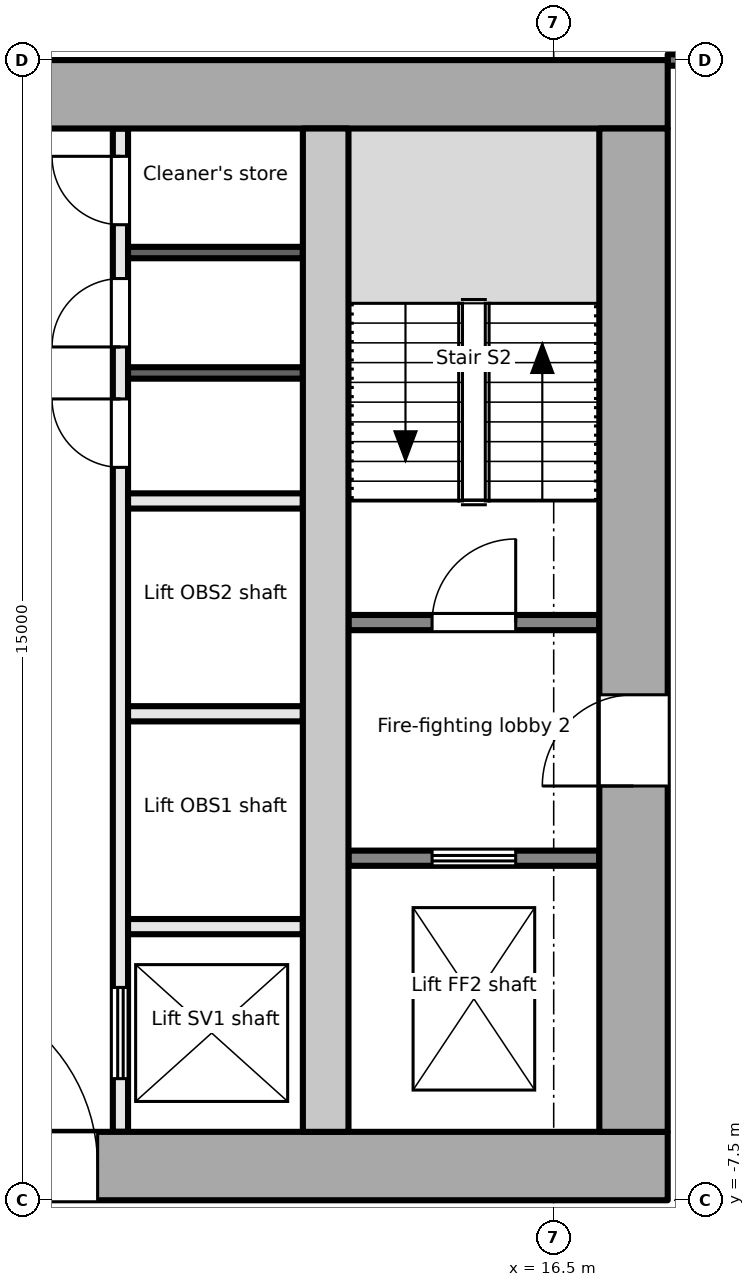
"""IFC4 building model, lengths in metres.
Left out: names, types, materials, properties, quantities, classifications, styles, units other than length and angle.
Written with IfcOpenShell. Run it as: python <this file> out.ifc"""

import sys

from ifc_helpers import new_model, si_unit, direction, frame, frame_2d, origin, place, context, subcontext, project, spatial, rectangle, extrude, element, fill, save


model = new_model("IFC4")
c1 = context("Model", 3, precision=1e-05, world=origin(), true_north=direction((0.0, 1.0)))
c2 = subcontext(c1, "Body", "Model", "MODEL_VIEW")
j1 = project(units=[si_unit("LENGTHUNIT", "METRE"), si_unit("PLANEANGLEUNIT", "RADIAN")], contexts=[c1])
p1 = place(None, origin())
s1 = spatial("IfcSite", under=j1, at=p1, CompositionType="ELEMENT")
p2 = place(p1, origin())
s2 = spatial("IfcBuilding", under=s1, at=p2, CompositionType="ELEMENT")
p3 = place(p2, frame((0.0, 0.0, 213.5)))
s3 = spatial("IfcBuildingStorey", under=s2, at=p3, CompositionType="ELEMENT", Elevation=213.5)
p4 = place(p3, frame((-18.0, -7.05, -0.2), z_axis=(0.0, 0.0, 1.0), x_axis=(1.0, 0.0, 0.0)))
e1 = element("IfcWall", 1, at=p4, inside=s3, PredefinedType="SHEAR", context=c2, shape_type="SweptSolid", body=[
    extrude(rectangle(XDim=36.0, YDim=0.9, at=frame_2d((18.0, 0.0))), origin(), (0.0, 0.0, 1.0), 3.9),
])
p5 = place(p4, frame((4.9, 0.0, 0.2)))
e2 = element("IfcOpeningElement", 2, at=p5, cuts=e1, PredefinedType="OPENING", context=c2, shape_type="SweptSolid", body=[
    extrude(rectangle(XDim=1.8, YDim=2.1, at=frame_2d((0.9, 1.05))), frame((0.0, 0.46, 0.0), z_axis=(0.0, -1.0, 0.0), x_axis=(1.0, 0.0, 0.0)), (0.0, 0.0, 1.0), 0.921),
])
p6 = place(p4, frame((16.8, 0.0, 0.2)))
e3 = element("IfcOpeningElement", 3, at=p6, cuts=e1, PredefinedType="OPENING", context=c2, shape_type="SweptSolid", body=[
    extrude(rectangle(XDim=2.4, YDim=2.1, at=frame_2d((1.2, 1.05))), frame((0.0, 0.46, 0.0), z_axis=(0.0, -1.0, 0.0), x_axis=(1.0, 0.0, 0.0)), (0.0, 0.0, 1.0), 0.921),
])
p7 = place(p4, frame((26.1, 0.0, 0.2)))
e4 = element("IfcOpeningElement", 4, at=p7, cuts=e1, PredefinedType="OPENING", context=c2, shape_type="SweptSolid", body=[
    extrude(rectangle(XDim=2.4, YDim=2.1, at=frame_2d((1.2, 1.05))), frame((0.0, 0.46, 0.0), z_axis=(0.0, -1.0, 0.0), x_axis=(1.0, 0.0, 0.0)), (0.0, 0.0, 1.0), 0.921),
])
p8 = place(p3, frame((-18.0, 7.05, -0.2), z_axis=(0.0, 0.0, 1.0), x_axis=(1.0, 0.0, 0.0)))
e5 = element("IfcWall", 5, at=p8, inside=s3, PredefinedType="SHEAR", context=c2, shape_type="SweptSolid", body=[
    extrude(rectangle(XDim=36.0, YDim=0.9, at=frame_2d((18.0, 0.0))), origin(), (0.0, 0.0, 1.0), 3.9),
])
p9 = place(p3, frame((17.55, -6.6, -0.2), z_axis=(0.0, 0.0, 1.0), x_axis=(0.0, 1.0, 0.0)))
e6 = element("IfcWall", 6, at=p9, inside=s3, PredefinedType="SHEAR", context=c2, shape_type="SweptSolid", body=[
    extrude(rectangle(XDim=13.2, YDim=0.9, at=frame_2d((6.6, 0.0))), origin(), (0.0, 0.0, 1.0), 3.9),
])
p10 = place(p9, frame((4.55, 0.0, 0.2)))
e7 = element("IfcOpeningElement", 7, at=p10, cuts=e6, PredefinedType="OPENING", context=c2, shape_type="SweptSolid", body=[
    extrude(rectangle(XDim=1.2, YDim=2.1, at=frame_2d((0.6, 1.05))), frame((0.0, 0.46, 0.0), z_axis=(0.0, -1.0, 0.0), x_axis=(1.0, 0.0, 0.0)), (0.0, 0.0, 1.0), 0.921),
])
p11 = place(p3, frame((13.5, -6.6, -0.2), z_axis=(0.0, 0.0, 1.0), x_axis=(0.0, 1.0, 0.0)))
e8 = element("IfcWall", 8, at=p11, inside=s3, PredefinedType="SHEAR", context=c2, shape_type="SweptSolid", body=[
    extrude(rectangle(XDim=13.2, YDim=0.6, at=frame_2d((6.6, 0.0))), origin(), (0.0, 0.0, 1.0), 3.9),
])
p12 = place(p3, frame((13.8, -3.0, 0.0), z_axis=(0.0, 0.0, 1.0), x_axis=(1.0, 0.0, 0.0)))
e9 = element("IfcWall", 9, at=p12, inside=s3, PredefinedType="PARTITIONING", context=c2, shape_type="SweptSolid", body=[
    extrude(rectangle(XDim=3.3, YDim=0.2, at=frame_2d((1.65, 0.0))), origin(), (0.0, 0.0, 1.0), 3.7),
])
p13 = place(p12, frame((1.1, 0.0, 0.0)))
e10 = element("IfcOpeningElement", 10, at=p13, cuts=e9, PredefinedType="OPENING", context=c2, shape_type="SweptSolid", body=[
    extrude(rectangle(XDim=1.1, YDim=2.1, at=frame_2d((0.55, 1.05))), frame((0.0, 0.111, 0.0), z_axis=(0.0, -1.0, 0.0), x_axis=(1.0, 0.0, 0.0)), (0.0, 0.0, 1.0), 0.221),
])
p14 = place(p3, frame((13.8, 0.1, 0.0), z_axis=(0.0, 0.0, 1.0), x_axis=(1.0, 0.0, 0.0)))
e11 = element("IfcWall", 11, at=p14, inside=s3, PredefinedType="PARTITIONING", context=c2, shape_type="SweptSolid", body=[
    extrude(rectangle(XDim=3.3, YDim=0.2, at=frame_2d((1.65, 0.0))), origin(), (0.0, 0.0, 1.0), 3.7),
])
p15 = place(p14, frame((1.1, 0.0, 0.0)))
e12 = element("IfcOpeningElement", 12, at=p15, cuts=e11, PredefinedType="OPENING", context=c2, shape_type="SweptSolid", body=[
    extrude(rectangle(XDim=1.1, YDim=2.1, at=frame_2d((0.55, 1.05))), frame((0.0, 0.111, 0.0), z_axis=(0.0, -1.0, 0.0), x_axis=(1.0, 0.0, 0.0)), (0.0, 0.0, 1.0), 0.221),
])
p16 = place(p3, frame((10.8, -6.6, 0.0), z_axis=(0.0, 0.0, 1.0), x_axis=(0.0, 1.0, 0.0)))
e13 = element("IfcWall", 13, at=p16, inside=s3, PredefinedType="PARTITIONING", context=c2, shape_type="SweptSolid", body=[
    extrude(rectangle(XDim=13.2, YDim=0.2, at=frame_2d((6.6, 0.0))), origin(), (0.0, 0.0, 1.0), 3.7),
])
p17 = place(p16, frame((0.7, 0.0, 0.0)))
e14 = element("IfcOpeningElement", 14, at=p17, cuts=e13, PredefinedType="OPENING", context=c2, shape_type="SweptSolid", body=[
    extrude(rectangle(XDim=1.2, YDim=2.1, at=frame_2d((0.6, 1.05))), frame((0.0, 0.111, 0.0), z_axis=(0.0, -1.0, 0.0), x_axis=(1.0, 0.0, 0.0)), (0.0, 0.0, 1.0), 0.221),
])
p18 = place(p16, frame((8.742, 0.0, 0.0)))
e15 = element("IfcOpeningElement", 15, at=p18, cuts=e13, PredefinedType="OPENING", context=c2, shape_type="SweptSolid", body=[
    extrude(rectangle(XDim=0.9, YDim=2.1, at=frame_2d((0.45, 1.05))), frame((0.0, 0.111, 0.0), z_axis=(0.0, -1.0, 0.0), x_axis=(1.0, 0.0, 0.0)), (0.0, 0.0, 1.0), 0.221),
])
p19 = place(p16, frame((10.326, 0.0, 0.0)))
e16 = element("IfcOpeningElement", 16, at=p19, cuts=e13, PredefinedType="OPENING", context=c2, shape_type="SweptSolid", body=[
    extrude(rectangle(XDim=0.9, YDim=2.1, at=frame_2d((0.45, 1.05))), frame((0.0, 0.111, 0.0), z_axis=(0.0, -1.0, 0.0), x_axis=(1.0, 0.0, 0.0)), (0.0, 0.0, 1.0), 0.221),
])
p20 = place(p16, frame((11.934, 0.0, 0.0)))
e17 = element("IfcOpeningElement", 17, at=p20, cuts=e13, PredefinedType="OPENING", context=c2, shape_type="SweptSolid", body=[
    extrude(rectangle(XDim=0.9, YDim=2.1, at=frame_2d((0.45, 1.05))), frame((0.0, 0.111, 0.0), z_axis=(0.0, -1.0, 0.0), x_axis=(1.0, 0.0, 0.0)), (0.0, 0.0, 1.0), 0.221),
])
for number, where, z_axis, x_axis in (
    (18, (10.9, -3.9, 0.0), (0.0, 0.0, 1.0), (1.0, 0.0, 0.0)),
    (19, (10.9, -1.1, 0.0), (0.0, 0.0, 1.0), (1.0, 0.0, 0.0)),
    (20, (10.9, 1.7, 0.0), (0.0, 0.0, 1.0), (1.0, 0.0, 0.0)),
):
    element("IfcWall", number, at=place(p3, frame(where, z_axis=z_axis, x_axis=x_axis)), inside=s3, PredefinedType="PARTITIONING", context=c2, shape_type="SweptSolid", body=[
        extrude(rectangle(XDim=2.3, YDim=0.2, at=frame_2d((1.15, 0.0))), origin(), (0.0, 0.0, 1.0), 3.7),
    ])
for number, where, z_axis, x_axis in (
    (21, (10.9, 3.384, 0.0), (0.0, 0.0, 1.0), (1.0, 0.0, 0.0)),
    (22, (10.9, 4.968, 0.0), (0.0, 0.0, 1.0), (1.0, 0.0, 0.0)),
):
    element("IfcWall", number, at=place(p3, frame(where, z_axis=z_axis, x_axis=x_axis)), inside=s3, PredefinedType="PARTITIONING", context=c2, shape_type="SweptSolid", body=[
        extrude(rectangle(XDim=2.3, YDim=0.15, at=frame_2d((1.15, 0.0))), origin(), (0.0, 0.0, 1.0), 3.7),
    ])
p21 = place(p3, frame((18.0, 7.501, 0.0), z_axis=(0.0, 0.0, 1.0), x_axis=(1.0, 0.0, 0.0)))
e23 = element("IfcWall", 23, at=p21, inside=s3, PredefinedType="PARTITIONING", context=c2, shape_type="SweptSolid", body=[
    extrude(rectangle(XDim=2.625, YDim=0.15, at=frame_2d((1.312, 0.0))), origin(), (0.0, 0.0, 1.0), 3.7),
])
p22 = place(p13, origin())
e24 = element("IfcDoor", 24, at=p22, inside=s3, OperationType="DOUBLE_DOOR_SLIDING", PredefinedType="DOOR", context=c2, shape_type="SweptSolid", body=[
    extrude(rectangle(XDim=1.1, YDim=2.1, at=frame_2d((0.55, 1.05))), frame((0.0, 0.025, 0.0), z_axis=(0.0, -1.0, 0.0), x_axis=(1.0, 0.0, 0.0)), (0.0, 0.0, 1.0), 0.05),
])
fill(e10, e24)
p23 = place(p10, origin())
e25 = element("IfcDoor", 25, at=p23, inside=s3, OperationType="SINGLE_SWING_LEFT", PredefinedType="DOOR", context=c2, shape_type="SweptSolid", body=[
    extrude(rectangle(XDim=1.2, YDim=2.1, at=frame_2d((0.6, 1.05))), frame((0.0, 0.025, 0.0), z_axis=(0.0, -1.0, 0.0), x_axis=(1.0, 0.0, 0.0)), (0.0, 0.0, 1.0), 0.05),
])
fill(e7, e25)
p24 = place(p15, origin())
e26 = element("IfcDoor", 26, at=p24, inside=s3, OperationType="SINGLE_SWING_RIGHT", PredefinedType="DOOR", context=c2, shape_type="SweptSolid", body=[
    extrude(rectangle(XDim=1.1, YDim=2.1, at=frame_2d((0.55, 1.05))), frame((0.0, 0.025, 0.0), z_axis=(0.0, -1.0, 0.0), x_axis=(1.0, 0.0, 0.0)), (0.0, 0.0, 1.0), 0.05),
])
fill(e12, e26)
p25 = place(p7, origin())
e27 = element("IfcDoor", 27, at=p25, inside=s3, OperationType="DOUBLE_DOOR_DOUBLE_SWING", PredefinedType="DOOR", context=c2, shape_type="SweptSolid", body=[
    extrude(rectangle(XDim=2.4, YDim=2.1, at=frame_2d((1.2, 1.05))), frame((0.0, 0.025, 0.0), z_axis=(0.0, -1.0, 0.0), x_axis=(1.0, 0.0, 0.0)), (0.0, 0.0, 1.0), 0.05),
])
fill(e4, e27)
p26 = place(p17, origin())
e28 = element("IfcDoor", 28, at=p26, inside=s3, OperationType="DOUBLE_DOOR_SLIDING", PredefinedType="DOOR", context=c2, shape_type="SweptSolid", body=[
    extrude(rectangle(XDim=1.2, YDim=2.1, at=frame_2d((0.6, 1.05))), frame((0.0, 0.025, 0.0), z_axis=(0.0, -1.0, 0.0), x_axis=(1.0, 0.0, 0.0)), (0.0, 0.0, 1.0), 0.05),
])
fill(e14, e28)
p27 = place(p18, origin())
e29 = element("IfcDoor", 29, at=p27, inside=s3, OperationType="SINGLE_SWING_RIGHT", PredefinedType="DOOR", context=c2, shape_type="SweptSolid", body=[
    extrude(rectangle(XDim=0.9, YDim=2.1, at=frame_2d((0.45, 1.05))), frame((0.0, 0.025, 0.0), z_axis=(0.0, -1.0, 0.0), x_axis=(1.0, 0.0, 0.0)), (0.0, 0.0, 1.0), 0.05),
])
fill(e15, e29)
p28 = place(p19, origin())
e30 = element("IfcDoor", 30, at=p28, inside=s3, OperationType="SINGLE_SWING_LEFT", PredefinedType="DOOR", context=c2, shape_type="SweptSolid", body=[
    extrude(rectangle(XDim=0.9, YDim=2.1, at=frame_2d((0.45, 1.05))), frame((0.0, 0.025, 0.0), z_axis=(0.0, -1.0, 0.0), x_axis=(1.0, 0.0, 0.0)), (0.0, 0.0, 1.0), 0.05),
])
fill(e16, e30)
p29 = place(p20, origin())
e31 = element("IfcDoor", 31, at=p29, inside=s3, OperationType="SINGLE_SWING_RIGHT", PredefinedType="DOOR", context=c2, shape_type="SweptSolid", body=[
    extrude(rectangle(XDim=0.9, YDim=2.1, at=frame_2d((0.45, 1.05))), frame((0.0, 0.025, 0.0), z_axis=(0.0, -1.0, 0.0), x_axis=(1.0, 0.0, 0.0)), (0.0, 0.0, 1.0), 0.05),
])
fill(e17, e31)
save(model, sys.argv[1])
